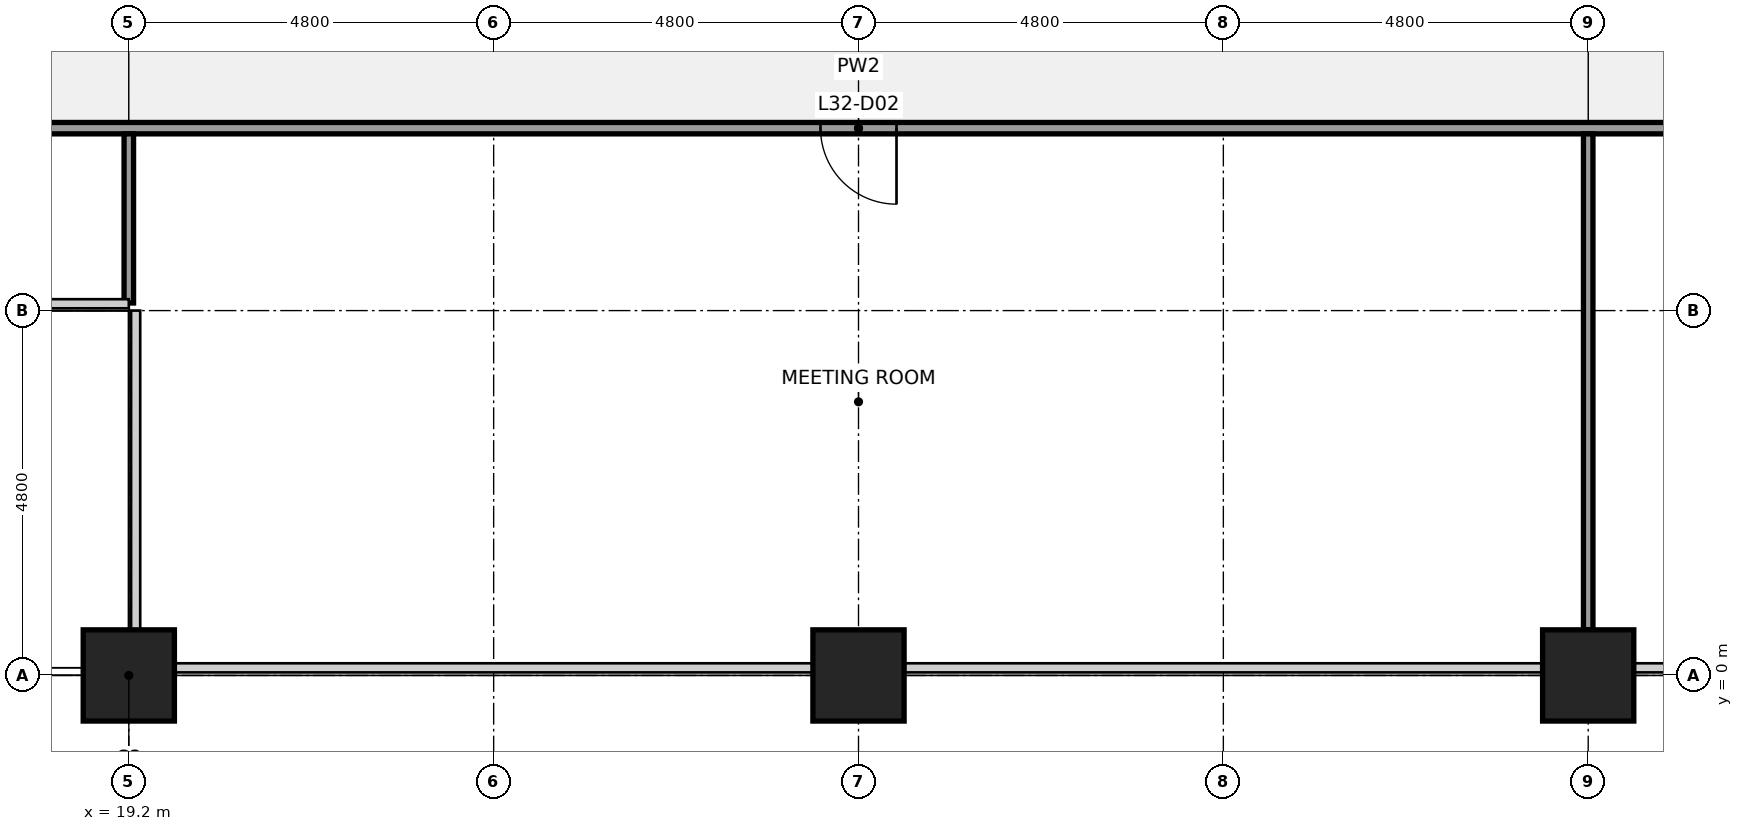
"""IFC4 building model, lengths in metres.
Left out: names, types, materials, properties, quantities, classifications, styles, units other than length and angle.
Written with IfcOpenShell. Run it as: python <this file> out.ifc"""

import sys

from ifc_helpers import new_model, si_unit, direction, frame, frame_2d, origin, origin_2d, place, context, subcontext, project, spatial, rectangle, extrude, element, fill, save


model = new_model("IFC4")
c1 = context("Model", 3, precision=1e-05, world=origin(), true_north=direction((0.0, 1.0)))
c2 = subcontext(c1, "Body", "Model", "MODEL_VIEW")
j1 = project(units=[si_unit("LENGTHUNIT", "METRE"), si_unit("PLANEANGLEUNIT", "RADIAN")], contexts=[c1])
p1 = place(None, origin())
s1 = spatial("IfcSite", under=j1, at=p1, CompositionType="ELEMENT")
p2 = place(p1, origin())
s2 = spatial("IfcBuilding", under=s1, at=p2, CompositionType="ELEMENT")
p3 = place(p2, frame((0.0, 0.0, 148.1)))
s3 = spatial("IfcBuildingStorey", under=s2, at=p3, CompositionType="ELEMENT", Elevation=148.1)
for number, where, z_axis, x_axis in (
    (1, (19.2, 0.0, 0.0), (0.0, 0.0, 1.0), (1.0, 0.0, 0.0)),
    (2, (28.8, 0.0, 0.0), (0.0, 0.0, 1.0), (1.0, 0.0, 0.0)),
    (3, (38.4, 0.0, 0.0), (0.0, 0.0, 1.0), (1.0, 0.0, 0.0)),
):
    element("IfcColumn", number, at=place(p3, frame(where, z_axis=z_axis, x_axis=x_axis)), inside=s3, PredefinedType="COLUMN", context=c2, shape_type="SweptSolid", body=[
        extrude(rectangle(XDim=1.2, YDim=1.2, at=origin_2d()), origin(), (0.0, 0.0, 1.0), 4.0),
    ])
p4 = place(p3, frame((14.325, 7.2, 0.0), z_axis=(0.0, 0.0, 1.0), x_axis=(1.0, 0.0, 0.0)))
e4 = element("IfcWall", 4, at=p4, inside=s3, PredefinedType="PARTITIONING", context=c2, shape_type="SweptSolid", body=[
    extrude(rectangle(XDim=28.95, YDim=0.15, at=frame_2d((14.475, 0.0))), origin(), (0.0, 0.0, 1.0), 2.849),
])
p5 = place(p4, frame((1.375, 0.0, 0.0)))
e5 = element("IfcOpeningElement", 5, at=p5, cuts=e4, PredefinedType="OPENING", context=c2, shape_type="SweptSolid", body=[
    extrude(rectangle(XDim=1.0, YDim=2.1, at=frame_2d((0.5, 1.05))), frame((0.0, 0.085, 0.0), z_axis=(0.0, -1.0, 0.0), x_axis=(1.0, 0.0, 0.0)), (0.0, 0.0, 1.0), 0.17),
])
p6 = place(p4, frame((13.975, 0.0, 0.0)))
e6 = element("IfcOpeningElement", 6, at=p6, cuts=e4, PredefinedType="OPENING", context=c2, shape_type="SweptSolid", body=[
    extrude(rectangle(XDim=1.0, YDim=2.1, at=frame_2d((0.5, 1.05))), frame((0.0, 0.085, 0.0), z_axis=(0.0, -1.0, 0.0), x_axis=(1.0, 0.0, 0.0)), (0.0, 0.0, 1.0), 0.17),
])
p7 = place(p4, frame((25.975, 0.0, 0.0)))
e7 = element("IfcOpeningElement", 7, at=p7, cuts=e4, PredefinedType="OPENING", context=c2, shape_type="SweptSolid", body=[
    extrude(rectangle(XDim=1.0, YDim=2.1, at=frame_2d((0.5, 1.05))), frame((0.0, 0.085, 0.0), z_axis=(0.0, -1.0, 0.0), x_axis=(1.0, 0.0, 0.0)), (0.0, 0.0, 1.0), 0.17),
])
p8 = place(p3, frame((19.2, 4.9, 0.0), z_axis=(0.0, 0.0, 1.0), x_axis=(0.0, 1.0, 0.0)))
e8 = element("IfcWall", 8, at=p8, inside=s3, PredefinedType="PARTITIONING", context=c2, shape_type="SweptSolid", body=[
    extrude(rectangle(XDim=2.225, YDim=0.125, at=frame_2d((1.113, 0.0))), origin(), (0.0, 0.0, 1.0), 2.849),
])
p9 = place(p3, frame((38.4, 0.6, 0.0), z_axis=(0.0, 0.0, 1.0), x_axis=(0.0, 1.0, 0.0)))
e9 = element("IfcWall", 9, at=p9, inside=s3, PredefinedType="PARTITIONING", context=c2, shape_type="SweptSolid", body=[
    extrude(rectangle(XDim=6.525, YDim=0.125, at=frame_2d((3.262, 0.0))), origin(), (0.0, 0.0, 1.0), 2.849),
])
for number, where, z_axis, x_axis in (
    (10, (19.2, -1.05, 0.0), (0.0, 0.0, 1.0), (1.0, 0.0, 0.0)),
    (11, (38.4, -1.05, 0.0), (0.0, 0.0, 1.0), (1.0, 0.0, 0.0)),
):
    element("IfcColumn", number, at=place(p3, frame(where, z_axis=z_axis, x_axis=x_axis)), inside=s3, PredefinedType="PILASTER", context=c2, shape_type="SweptSolid", body=[
        extrude(rectangle(XDim=3.6, YDim=0.9, at=origin_2d()), origin(), (0.0, 0.0, 1.0), 4.0),
    ])
p10 = place(p6, origin())
e12 = element("IfcDoor", 12, at=p10, inside=s3, OperationType="SINGLE_SWING_RIGHT", PredefinedType="DOOR", context=c2, shape_type="SweptSolid", body=[
    extrude(rectangle(XDim=1.0, YDim=2.1, at=frame_2d((0.5, 1.05))), frame((0.0, 0.025, 0.0), z_axis=(0.0, -1.0, 0.0), x_axis=(1.0, 0.0, 0.0)), (0.0, 0.0, 1.0), 0.05),
])
fill(e6, e12)
save(model, sys.argv[1])
